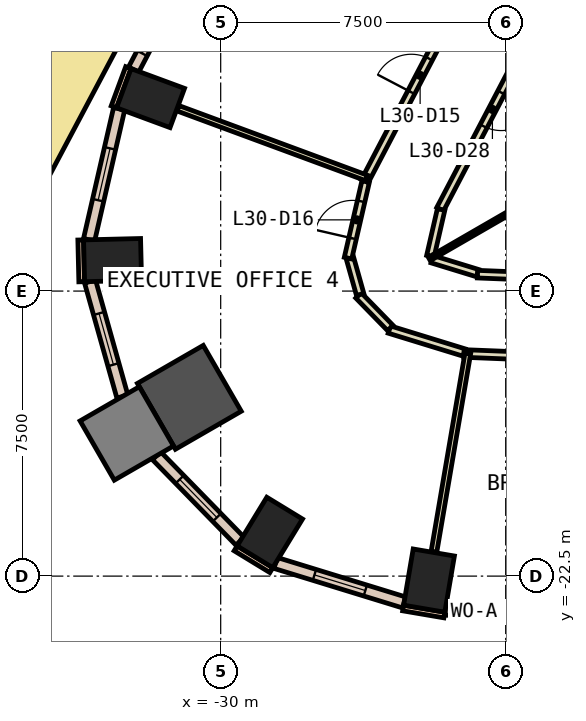
"""IFC4 building model, lengths in metres.
Left out: names, types, materials, properties, quantities, classifications, styles, units other than length and angle.
Written with IfcOpenShell. Run it as: python <this file> out.ifc"""

import sys

from ifc_helpers import new_model, si_unit, direction, frame, frame_2d, origin, origin_2d, place, context, subcontext, project, spatial, rectangle, extrude, element, fill, save


model = new_model("IFC4")
c1 = context("Model", 3, precision=1e-05, world=origin(), true_north=direction((0.0, 1.0)))
c2 = subcontext(c1, "Body", "Model", "MODEL_VIEW")
j1 = project(units=[si_unit("LENGTHUNIT", "METRE"), si_unit("PLANEANGLEUNIT", "RADIAN")], contexts=[c1])
p1 = place(None, origin())
s1 = spatial("IfcSite", under=j1, at=p1, CompositionType="ELEMENT")
p2 = place(p1, origin())
s2 = spatial("IfcBuilding", under=s1, at=p2, CompositionType="ELEMENT")
p3 = place(p2, frame((0.0, 0.0, 138.2)))
s3 = spatial("IfcBuildingStorey", under=s2, at=p3, CompositionType="ELEMENT", Elevation=138.2)
for number, where, z_axis, x_axis in (
    (1, (-24.518, -22.618, 0.0), (0.0, 0.0, 1.0), (-0.986, 0.168, 0.0)),
    (2, (-31.846, -9.923, 0.0), (0.0, 0.0, 1.0), (0.347, 0.938, 0.0)),
    (3, (-32.845, -14.185, 0.0), (0.0, 0.0, 1.0), (-0.024, 1.0, 0.0)),
):
    element("IfcColumn", number, at=place(p3, frame(where, z_axis=z_axis, x_axis=x_axis)), inside=s3, PredefinedType="COLUMN", context=c2, shape_type="SweptSolid", body=[
        extrude(rectangle(XDim=1.1, YDim=1.5, at=origin_2d()), origin(), (0.0, 0.0, 1.0), 3.8),
    ])
p4 = place(p3, frame((-30.825, -17.796, 0.0), z_axis=(0.0, 0.0, 1.0), x_axis=(0.866025403784, 0.5, 0.0)))
e4 = element("IfcColumn", 4, at=p4, inside=s3, PredefinedType="COLUMN", context=c2, shape_type="SweptSolid", body=[
    extrude(rectangle(XDim=2.0, YDim=2.0, at=origin_2d()), origin(), (0.0, 0.0, 1.0), 3.8),
])
p5 = place(p3, frame((-28.707, -21.352, 0.0), z_axis=(0.0, 0.0, 1.0), x_axis=(-0.853714435155, 0.520741455243, 0.0)))
e5 = element("IfcColumn", 5, at=p5, inside=s3, PredefinedType="COLUMN", context=c2, shape_type="SweptSolid", body=[
    extrude(rectangle(XDim=1.1, YDim=1.5, at=origin_2d()), origin(), (0.0, 0.0, 1.0), 3.8),
])
p6 = place(p3, frame((-32.47, -18.746, 0.0), z_axis=(0.0, 0.0, 1.0), x_axis=(0.866025403784, 0.5, 0.0)))
e6 = element("IfcColumn", 6, at=p6, inside=s3, PredefinedType="COLUMN", context=c2, shape_type="SweptSolid", body=[
    extrude(rectangle(XDim=1.8, YDim=1.8, at=origin_2d()), origin(), (0.0, 0.0, 1.0), 3.8),
])
p7 = place(p3, frame((-32.429, -9.121, 0.0), z_axis=(0.0, 0.0, 1.0), x_axis=(-0.346425160624, -0.93807761304, 0.0)))
e7 = element("IfcWall", 7, at=p7, inside=s3, PredefinedType="STANDARD", context=c2, shape_type="SweptSolid", body=[
    extrude(rectangle(XDim=1.1, YDim=0.15, at=frame_2d((0.55, 0.0))), origin(), (0.0, 0.0, 1.0), 3.8),
])
p8 = place(p3, frame((-25.199, -23.339, 0.0), z_axis=(0.0, 0.0, 1.0), x_axis=(0.985800082077, -0.167923191299, 0.0)))
e8 = element("IfcWall", 8, at=p8, inside=s3, PredefinedType="STANDARD", context=c2, shape_type="SweptSolid", body=[
    extrude(rectangle(XDim=1.101, YDim=0.15, at=frame_2d((0.55, 0.0))), origin(), (0.0, 0.0, 1.0), 3.8),
])
p9 = place(p3, frame((-33.683, -13.655, 0.0), z_axis=(0.0, 0.0, 1.0), x_axis=(0.023744690764, -0.999718055084, 0.0)))
e9 = element("IfcWall", 9, at=p9, inside=s3, PredefinedType="STANDARD", context=c2, shape_type="SweptSolid", body=[
    extrude(rectangle(XDim=1.1, YDim=0.15, at=frame_2d((0.55, 0.0))), origin(), (0.0, 0.0, 1.0), 3.8),
])
p10 = place(p3, frame((-29.606, -21.77, 0.0), z_axis=(0.0, 0.0, 1.0), x_axis=(0.854005542721, -0.520263907071, 0.0)))
e10 = element("IfcWall", 10, at=p10, inside=s3, PredefinedType="STANDARD", context=c2, shape_type="SweptSolid", body=[
    extrude(rectangle(XDim=1.099, YDim=0.15, at=frame_2d((0.55, 0.0))), origin(), (0.0, 0.0, 1.0), 3.8),
])
p11 = place(p3, frame((-24.09, -23.378, 0.0), z_axis=(0.0, 0.0, 1.0), x_axis=(0.999203621229, -0.039901420066, 0.0)))
e11 = element("IfcWall", 11, at=p11, inside=s3, PredefinedType="STANDARD", context=c2, shape_type="SweptSolid", body=[
    extrude(rectangle(XDim=7.318, YDim=0.3, at=frame_2d((3.659, 0.0))), origin(), (0.0, 0.0, 1.0), 3.8),
])
p12 = place(p11, frame((0.629, 0.0, 0.9)))
e12 = element("IfcOpeningElement", 12, at=p12, cuts=e11, PredefinedType="OPENING", context=c2, shape_type="SweptSolid", body=[
    extrude(rectangle(XDim=2.4, YDim=2.6, at=frame_2d((1.2, 1.3))), frame((0.0, 0.16, 0.0), z_axis=(0.0, -1.0, 0.0), x_axis=(1.0, 0.0, 0.0)), (0.0, 0.0, 1.0), 0.32),
])
p13 = place(p11, frame((4.288, 0.0, 0.9)))
e13 = element("IfcOpeningElement", 13, at=p13, cuts=e11, PredefinedType="OPENING", context=c2, shape_type="SweptSolid", body=[
    extrude(rectangle(XDim=2.4, YDim=2.6, at=frame_2d((1.2, 1.3))), frame((0.0, 0.16, 0.0), z_axis=(0.0, -1.0, 0.0), x_axis=(1.0, 0.0, 0.0)), (0.0, 0.0, 1.0), 0.32),
])
p14 = place(p3, frame((-29.542, -3.922, 0.0), z_axis=(0.0, 0.0, 1.0), x_axis=(-0.463809970306, -0.885934710599, 0.0)))
e14 = element("IfcWall", 14, at=p14, inside=s3, PredefinedType="STANDARD", context=c2, shape_type="SweptSolid", body=[
    extrude(rectangle(XDim=5.927, YDim=0.3, at=frame_2d((2.963, 0.0))), origin(), (0.0, 0.0, 1.0), 3.8),
])
p15 = place(p14, frame((0.482, 0.0, 0.9)))
e15 = element("IfcOpeningElement", 15, at=p15, cuts=e14, PredefinedType="OPENING", context=c2, shape_type="SweptSolid", body=[
    extrude(rectangle(XDim=2.0, YDim=2.6, at=frame_2d((1.0, 1.3))), frame((0.0, 0.16, 0.0), z_axis=(0.0, -1.0, 0.0), x_axis=(1.0, 0.0, 0.0)), (0.0, 0.0, 1.0), 0.32),
])
p16 = place(p14, frame((3.445, 0.0, 0.9)))
e16 = element("IfcOpeningElement", 16, at=p16, cuts=e14, PredefinedType="OPENING", context=c2, shape_type="SweptSolid", body=[
    extrude(rectangle(XDim=2.0, YDim=2.6, at=frame_2d((1.0, 1.3))), frame((0.0, 0.16, 0.0), z_axis=(0.0, -1.0, 0.0), x_axis=(1.0, 0.0, 0.0)), (0.0, 0.0, 1.0), 0.32),
])
p17 = place(p3, frame((-32.672, -10.203, 0.0), z_axis=(0.0, 0.0, 1.0), x_axis=(-0.223538714932, -0.974695051247, 0.0)))
e17 = element("IfcWall", 17, at=p17, inside=s3, PredefinedType="STANDARD", context=c2, shape_type="SweptSolid", body=[
    extrude(rectangle(XDim=3.538, YDim=0.3, at=frame_2d((1.769, 0.0))), origin(), (0.0, 0.0, 1.0), 3.8),
])
p18 = place(p17, frame((1.069, 0.0, 0.9)))
e18 = element("IfcOpeningElement", 18, at=p18, cuts=e17, PredefinedType="OPENING", context=c2, shape_type="SweptSolid", body=[
    extrude(rectangle(XDim=1.4, YDim=2.6, at=frame_2d((0.7, 1.3))), frame((0.0, 0.16, 0.0), z_axis=(0.0, -1.0, 0.0), x_axis=(1.0, 0.0, 0.0)), (0.0, 0.0, 1.0), 0.32),
])
p19 = place(p3, frame((-33.437, -14.749, 0.0), z_axis=(0.0, 0.0, 1.0), x_axis=(0.270471130801, -0.962728085912, 0.0)))
e19 = element("IfcWall", 19, at=p19, inside=s3, PredefinedType="STANDARD", context=c2, shape_type="SweptSolid", body=[
    extrude(rectangle(XDim=3.143, YDim=0.3, at=frame_2d((1.572, 0.0))), origin(), (0.0, 0.0, 1.0), 3.8),
])
p20 = place(p19, frame((0.872, 0.0, 0.9)))
e20 = element("IfcOpeningElement", 20, at=p20, cuts=e19, PredefinedType="OPENING", context=c2, shape_type="SweptSolid", body=[
    extrude(rectangle(XDim=1.4, YDim=2.6, at=frame_2d((0.7, 1.3))), frame((0.0, 0.16, 0.0), z_axis=(0.0, -1.0, 0.0), x_axis=(1.0, 0.0, 0.0)), (0.0, 0.0, 1.0), 0.32),
])
p21 = place(p3, frame((-31.688, -19.332, 0.0), z_axis=(0.0, 0.0, 1.0), x_axis=(0.698633260198, -0.715479956215, 0.0)))
e21 = element("IfcWall", 21, at=p21, inside=s3, PredefinedType="STANDARD", context=c2, shape_type="SweptSolid", body=[
    extrude(rectangle(XDim=3.145, YDim=0.3, at=frame_2d((1.572, 0.0))), origin(), (0.0, 0.0, 1.0), 3.8),
])
p22 = place(p21, frame((0.872, 0.0, 0.9)))
e22 = element("IfcOpeningElement", 22, at=p22, cuts=e21, PredefinedType="OPENING", context=c2, shape_type="SweptSolid", body=[
    extrude(rectangle(XDim=1.4, YDim=2.6, at=frame_2d((0.7, 1.3))), frame((0.0, 0.16, 0.0), z_axis=(0.0, -1.0, 0.0), x_axis=(1.0, 0.0, 0.0)), (0.0, 0.0, 1.0), 0.32),
])
p23 = place(p3, frame((-28.554, -22.154, 0.0), z_axis=(0.0, 0.0, 1.0), x_axis=(0.955874475611, -0.293775402094, 0.0)))
e23 = element("IfcWall", 23, at=p23, inside=s3, PredefinedType="STANDARD", context=c2, shape_type="SweptSolid", body=[
    extrude(rectangle(XDim=3.537, YDim=0.3, at=frame_2d((1.769, 0.0))), origin(), (0.0, 0.0, 1.0), 3.8),
])
p24 = place(p23, frame((1.069, 0.0, 0.9)))
e24 = element("IfcOpeningElement", 24, at=p24, cuts=e23, PredefinedType="OPENING", context=c2, shape_type="SweptSolid", body=[
    extrude(rectangle(XDim=1.4, YDim=2.6, at=frame_2d((0.7, 1.3))), frame((0.0, 0.16, 0.0), z_axis=(0.0, -1.0, 0.0), x_axis=(1.0, 0.0, 0.0)), (0.0, 0.0, 1.0), 0.32),
])
p25 = place(p3, frame((-33.015, -7.123, 0.0), z_axis=(0.0, 0.0, 1.0), x_axis=(-0.468724005249, -0.883344670501, 0.0)))
e25 = element("IfcWall", 25, at=p25, inside=s3, PredefinedType="STANDARD", context=c2, shape_type="SweptSolid", body=[
    extrude(rectangle(XDim=5.217, YDim=1.9, at=frame_2d((2.608, 0.0))), origin(), (0.0, 0.0, 1.0), 0.8),
])
p26 = place(p3, frame((-21.475, -7.594, 0.0), z_axis=(0.0, 0.0, 1.0), x_axis=(-0.463809970306, -0.885934710599, 0.0)))
e26 = element("IfcWall", 26, at=p26, inside=s3, PredefinedType="PARTITIONING", context=c2, shape_type="SweptSolid", body=[
    extrude(rectangle(XDim=5.927, YDim=0.2, at=frame_2d((2.963, 0.0))), origin(), (0.0, 0.0, 1.0), 3.8),
])
p27 = place(p26, frame((2.464, 0.0, 0.0)))
e27 = element("IfcOpeningElement", 27, at=p27, cuts=e26, PredefinedType="OPENING", context=c2, shape_type="SweptSolid", body=[
    extrude(rectangle(XDim=1.0, YDim=2.1, at=frame_2d((0.5, 1.05))), frame((0.0, 0.11, 0.0), z_axis=(0.0, -1.0, 0.0), x_axis=(1.0, 0.0, 0.0)), (0.0, 0.0, 1.0), 0.22),
])
p28 = place(p3, frame((-24.2, -12.854, 0.0), z_axis=(0.0, 0.0, 1.0), x_axis=(-0.223967203961, -0.974596681479, 0.0)))
e28 = element("IfcWall", 28, at=p28, inside=s3, PredefinedType="PARTITIONING", context=c2, shape_type="SweptSolid", body=[
    extrude(rectangle(XDim=1.259, YDim=0.2, at=frame_2d((0.629, 0.0))), origin(), (0.0, 0.0, 1.0), 3.8),
])
p29 = place(p3, frame((-24.435, -14.162, 0.0), z_axis=(0.0, 0.0, 1.0), x_axis=(0.956086269468, -0.293085389152, 0.0)))
e29 = element("IfcWall", 29, at=p29, inside=s3, PredefinedType="PARTITIONING", context=c2, shape_type="SweptSolid", body=[
    extrude(rectangle(XDim=1.252, YDim=0.2, at=frame_2d((0.626, 0.0))), origin(), (0.0, 0.0, 1.0), 3.8),
])
p30 = place(p3, frame((-23.242, -14.555, 0.0), z_axis=(0.0, 0.0, 1.0), x_axis=(0.999202143743, -0.039938401802, 0.0)))
e30 = element("IfcWall", 30, at=p30, inside=s3, PredefinedType="PARTITIONING", context=c2, shape_type="SweptSolid", body=[
    extrude(rectangle(XDim=7.238, YDim=0.2, at=frame_2d((3.619, 0.0))), origin(), (0.0, 0.0, 1.0), 3.8),
])
p31 = place(p30, frame((3.119, 0.0, 0.0)))
e31 = element("IfcOpeningElement", 31, at=p31, cuts=e30, PredefinedType="OPENING", context=c2, shape_type="SweptSolid", body=[
    extrude(rectangle(XDim=1.0, YDim=2.1, at=frame_2d((0.5, 1.05))), frame((0.0, 0.11, 0.0), z_axis=(0.0, -1.0, 0.0), x_axis=(1.0, 0.0, 0.0)), (0.0, 0.0, 1.0), 0.22),
])
p32 = place(p3, frame((-26.21, -12.111, 0.0), z_axis=(0.0, 0.0, 1.0), x_axis=(0.46374980173, 0.885966207818, 0.0)))
e32 = element("IfcWall", 32, at=p32, inside=s3, PredefinedType="PARTITIONING", context=c2, shape_type="SweptSolid", body=[
    extrude(rectangle(XDim=6.137, YDim=0.2, at=frame_2d((3.068, 0.0))), origin(), (0.0, 0.0, 1.0), 3.8),
])
p33 = place(p32, frame((2.644, 0.0, 0.0)))
e33 = element("IfcOpeningElement", 33, at=p33, cuts=e32, PredefinedType="OPENING", context=c2, shape_type="SweptSolid", body=[
    extrude(rectangle(XDim=1.0, YDim=2.1, at=frame_2d((0.5, 1.05))), frame((0.0, 0.11, 0.0), z_axis=(0.0, -1.0, 0.0), x_axis=(1.0, 0.0, 0.0)), (0.0, 0.0, 1.0), 0.22),
])
p34 = place(p3, frame((-23.594, -16.617, 0.0), z_axis=(0.0, 0.0, 1.0), x_axis=(-0.955896815358, 0.293702704087, 0.0)))
e34 = element("IfcWall", 34, at=p34, inside=s3, PredefinedType="PARTITIONING", context=c2, shape_type="SweptSolid", body=[
    extrude(rectangle(XDim=2.06, YDim=0.2, at=frame_2d((1.03, 0.0))), origin(), (0.0, 0.0, 1.0), 3.8),
])
p35 = place(p3, frame((-25.538, -15.97, 0.0), z_axis=(0.0, 0.0, 1.0), x_axis=(-0.698272822523, 0.715831729756, 0.0)))
e35 = element("IfcWall", 35, at=p35, inside=s3, PredefinedType="PARTITIONING", context=c2, shape_type="SweptSolid", body=[
    extrude(rectangle(XDim=1.196, YDim=0.2, at=frame_2d((0.598, 0.0))), origin(), (0.0, 0.0, 1.0), 3.8),
])
p36 = place(p3, frame((-26.33, -15.089, 0.0), z_axis=(0.0, 0.0, 1.0), x_axis=(-0.270631784819, 0.962682936925, 0.0)))
e36 = element("IfcWall", 36, at=p36, inside=s3, PredefinedType="PARTITIONING", context=c2, shape_type="SweptSolid", body=[
    extrude(rectangle(XDim=0.994, YDim=0.2, at=frame_2d((0.497, 0.0))), origin(), (0.0, 0.0, 1.0), 3.8),
])
p37 = place(p3, frame((-26.649, -14.133, 0.0), z_axis=(0.0, 0.0, 1.0), x_axis=(0.224108401048, 0.974564222912, 0.0)))
e37 = element("IfcWall", 37, at=p37, inside=s3, PredefinedType="PARTITIONING", context=c2, shape_type="SweptSolid", body=[
    extrude(rectangle(XDim=2.065, YDim=0.2, at=frame_2d((1.033, 0.0))), origin(), (0.0, 0.0, 1.0), 3.8),
])
p38 = place(p37, frame((0.533, 0.0, 0.0)))
e38 = element("IfcOpeningElement", 38, at=p38, cuts=e37, PredefinedType="OPENING", context=c2, shape_type="SweptSolid", body=[
    extrude(rectangle(XDim=1.0, YDim=2.1, at=frame_2d((0.5, 1.05))), frame((0.0, 0.11, 0.0), z_axis=(0.0, -1.0, 0.0), x_axis=(1.0, 0.0, 0.0)), (0.0, 0.0, 1.0), 0.22),
])
p39 = place(p3, frame((-15.94, -16.948, 0.0), z_axis=(0.0, 0.0, 1.0), x_axis=(-0.999203094545, 0.03991460699, 0.0)))
e39 = element("IfcWall", 39, at=p39, inside=s3, PredefinedType="PARTITIONING", context=c2, shape_type="SweptSolid", body=[
    extrude(rectangle(XDim=7.664, YDim=0.2, at=frame_2d((3.832, 0.0))), origin(), (0.0, 0.0, 1.0), 3.8),
])
p40 = place(p39, frame((3.332, 0.0, 0.0)))
e40 = element("IfcOpeningElement", 40, at=p40, cuts=e39, PredefinedType="OPENING", context=c2, shape_type="SweptSolid", body=[
    extrude(rectangle(XDim=1.0, YDim=2.1, at=frame_2d((0.5, 1.05))), frame((0.0, 0.11, 0.0), z_axis=(0.0, -1.0, 0.0), x_axis=(1.0, 0.0, 0.0)), (0.0, 0.0, 1.0), 0.22),
])
p41 = place(p3, frame((-18.553, -10.715, 0.0), z_axis=(0.0, 0.0, 1.0), x_axis=(-0.865984622623, -0.500070628392, 0.0)))
e41 = element("IfcWall", 41, at=p41, inside=s3, PredefinedType="PARTITIONING", context=c2, shape_type="SweptSolid", body=[
    extrude(rectangle(XDim=6.879, YDim=0.1, at=frame_2d((3.439, 0.0))), origin(), (0.0, 0.0, 1.0), 3.8),
])
p42 = place(p3, frame((-26.164, -12.023, 0.0), z_axis=(0.0, 0.0, 1.0), x_axis=(-0.937995804261, 0.346646608505, 0.0)))
e42 = element("IfcWall", 42, at=p42, inside=s3, PredefinedType="PARTITIONING", context=c2, shape_type="SweptSolid", body=[
    extrude(rectangle(XDim=5.288, YDim=0.15, at=frame_2d((2.644, 0.0))), origin(), (0.0, 0.0, 1.0), 3.8),
])
p43 = place(p3, frame((-23.498, -16.646, 0.0), z_axis=(0.0, 0.0, 1.0), x_axis=(-0.168275674737, -0.985739974482, 0.0)))
e43 = element("IfcWall", 43, at=p43, inside=s3, PredefinedType="PARTITIONING", context=c2, shape_type="SweptSolid", body=[
    extrude(rectangle(XDim=5.288, YDim=0.15, at=frame_2d((2.644, 0.0))), origin(), (0.0, 0.0, 1.0), 3.8),
])
p44 = place(p12, origin())
e44 = element("IfcWindow", 44, at=p44, inside=s3, PartitioningType="SINGLE_PANEL", PredefinedType="WINDOW", context=c2, shape_type="SweptSolid", body=[
    extrude(rectangle(XDim=2.4, YDim=2.6, at=frame_2d((1.2, 1.3))), frame((0.0, 0.03, 0.0), z_axis=(0.0, -1.0, 0.0), x_axis=(1.0, 0.0, 0.0)), (0.0, 0.0, 1.0), 0.06),
])
fill(e12, e44)
p45 = place(p16, origin())
e45 = element("IfcWindow", 45, at=p45, inside=s3, PartitioningType="SINGLE_PANEL", PredefinedType="WINDOW", context=c2, shape_type="SweptSolid", body=[
    extrude(rectangle(XDim=2.0, YDim=2.6, at=frame_2d((1.0, 1.3))), frame((0.0, 0.03, 0.0), z_axis=(0.0, -1.0, 0.0), x_axis=(1.0, 0.0, 0.0)), (0.0, 0.0, 1.0), 0.06),
])
fill(e16, e45)
p46 = place(p18, origin())
e46 = element("IfcWindow", 46, at=p46, inside=s3, PartitioningType="SINGLE_PANEL", PredefinedType="WINDOW", context=c2, shape_type="SweptSolid", body=[
    extrude(rectangle(XDim=1.4, YDim=2.6, at=frame_2d((0.7, 1.3))), frame((0.0, 0.03, 0.0), z_axis=(0.0, -1.0, 0.0), x_axis=(1.0, 0.0, 0.0)), (0.0, 0.0, 1.0), 0.06),
])
fill(e18, e46)
p47 = place(p20, origin())
e47 = element("IfcWindow", 47, at=p47, inside=s3, PartitioningType="SINGLE_PANEL", PredefinedType="WINDOW", context=c2, shape_type="SweptSolid", body=[
    extrude(rectangle(XDim=1.4, YDim=2.6, at=frame_2d((0.7, 1.3))), frame((0.0, 0.03, 0.0), z_axis=(0.0, -1.0, 0.0), x_axis=(1.0, 0.0, 0.0)), (0.0, 0.0, 1.0), 0.06),
])
fill(e20, e47)
p48 = place(p22, origin())
e48 = element("IfcWindow", 48, at=p48, inside=s3, PartitioningType="SINGLE_PANEL", PredefinedType="WINDOW", context=c2, shape_type="SweptSolid", body=[
    extrude(rectangle(XDim=1.4, YDim=2.6, at=frame_2d((0.7, 1.3))), frame((0.0, 0.03, 0.0), z_axis=(0.0, -1.0, 0.0), x_axis=(1.0, 0.0, 0.0)), (0.0, 0.0, 1.0), 0.06),
])
fill(e22, e48)
p49 = place(p24, origin())
e49 = element("IfcWindow", 49, at=p49, inside=s3, PartitioningType="SINGLE_PANEL", PredefinedType="WINDOW", context=c2, shape_type="SweptSolid", body=[
    extrude(rectangle(XDim=1.4, YDim=2.6, at=frame_2d((0.7, 1.3))), frame((0.0, 0.03, 0.0), z_axis=(0.0, -1.0, 0.0), x_axis=(1.0, 0.0, 0.0)), (0.0, 0.0, 1.0), 0.06),
])
fill(e24, e49)
p50 = place(p33, origin())
e50 = element("IfcDoor", 50, at=p50, inside=s3, OperationType="SINGLE_SWING_LEFT", PredefinedType="DOOR", context=c2, shape_type="SweptSolid", body=[
    extrude(rectangle(XDim=1.0, YDim=2.1, at=frame_2d((0.5, 1.05))), frame((0.0, 0.025, 0.0), z_axis=(0.0, -1.0, 0.0), x_axis=(1.0, 0.0, 0.0)), (0.0, 0.0, 1.0), 0.05),
])
fill(e33, e50)
p51 = place(p38, origin())
e51 = element("IfcDoor", 51, at=p51, inside=s3, OperationType="SINGLE_SWING_LEFT", PredefinedType="DOOR", context=c2, shape_type="SweptSolid", body=[
    extrude(rectangle(XDim=1.0, YDim=2.1, at=frame_2d((0.5, 1.05))), frame((0.0, 0.025, 0.0), z_axis=(0.0, -1.0, 0.0), x_axis=(1.0, 0.0, 0.0)), (0.0, 0.0, 1.0), 0.05),
])
fill(e38, e51)
p52 = place(p27, origin())
e52 = element("IfcDoor", 52, at=p52, inside=s3, OperationType="SINGLE_SWING_LEFT", PredefinedType="DOOR", context=c2, shape_type="SweptSolid", body=[
    extrude(rectangle(XDim=1.0, YDim=2.1, at=frame_2d((0.5, 1.05))), frame((0.0, 0.025, 0.0), z_axis=(0.0, -1.0, 0.0), x_axis=(1.0, 0.0, 0.0)), (0.0, 0.0, 1.0), 0.05),
])
fill(e27, e52)
save(model, sys.argv[1])
